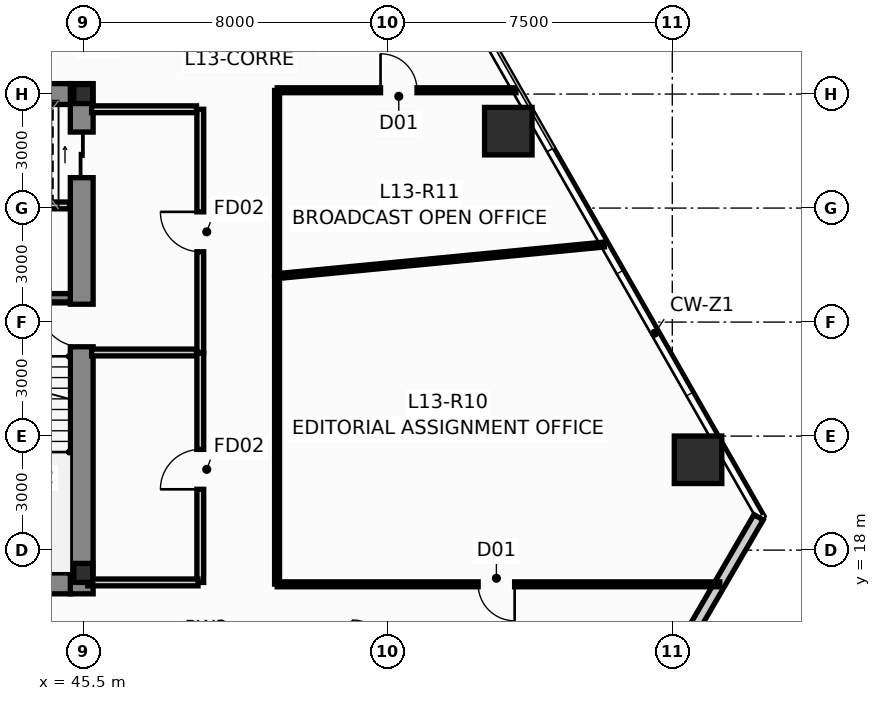
"""IFC4 building model, lengths in metres.
Left out: names, types, materials, properties, quantities, classifications, styles, units other than length and angle.
Written with IfcOpenShell. Run it as: python <this file> out.ifc"""

import sys

from ifc_helpers import new_model, si_unit, direction, frame, frame_2d, origin, origin_2d, place, context, subcontext, project, spatial, rectangle, hollow_rectangle, i_section, extrude, source, transform, mapped, element, fill, save


model = new_model("IFC4")
c1 = context("Model", 3, precision=1e-05, world=origin(), true_north=direction((0.0, 1.0)))
c2 = subcontext(c1, "Body", "Model", "MODEL_VIEW")
j1 = project(units=[si_unit("LENGTHUNIT", "METRE"), si_unit("PLANEANGLEUNIT", "RADIAN")], contexts=[c1])
p1 = place(None, origin())
s1 = spatial("IfcSite", under=j1, at=p1, CompositionType="ELEMENT")
p2 = place(p1, origin())
s2 = spatial("IfcBuilding", under=s1, at=p2, CompositionType="ELEMENT")
p3 = place(p2, frame((0.0, 0.0, 53.15)))
s3 = spatial("IfcBuildingStorey", under=s2, at=p3, CompositionType="ELEMENT", Elevation=53.15)
m1 = source(origin(), c2, "Body", "SweptSolid", [
    extrude(i_section(OverallWidth=0.5, OverallDepth=0.5, WebThickness=0.028, FlangeThickness=0.04, at=origin_2d()), origin(), (0.0, 0.0, 1.0), 3.65),
])
for number, where, z_axis, x_axis in (
    (1, (45.5, 17.4, 0.0), (0.0, 0.0, 1.0), (1.0, 0.0, 0.0)),
    (2, (45.5, 30.0, 0.0), (0.0, 0.0, 1.0), (1.0, 0.0, 0.0)),
):
    element("IfcColumn", number, at=place(p3, frame(where, z_axis=z_axis, x_axis=x_axis)), inside=s3, PredefinedType="COLUMN", context=c2, shape_type="MappedRepresentation", body=[
        mapped(m1, transform((0.0, 0.0, 0.0), scale=1.0)),
    ])
p4 = place(p3, frame((45.46, 16.85, 0.0), z_axis=(0.0, 0.0, 1.0), x_axis=(0.0, 1.0, 0.0)))
e3 = element("IfcWall", 3, at=p4, inside=s3, PredefinedType="SHEAR", context=c2, shape_type="SweptSolid", body=[
    extrude(rectangle(XDim=13.425, YDim=0.6, at=frame_2d((6.712, 0.0))), origin(), (0.0, 0.0, 1.0), 3.65),
])
p5 = place(p4, frame((6.5, 0.0, 0.0)))
e4 = element("IfcOpeningElement", 4, at=p5, cuts=e3, PredefinedType="OPENING", context=c2, shape_type="SweptSolid", body=[
    extrude(rectangle(XDim=1.12, YDim=2.15, at=frame_2d((0.56, 1.075))), frame((0.0, 0.312, 0.0), z_axis=(0.0, -1.0, 0.0), x_axis=(1.0, 0.0, 0.0)), (0.0, 0.0, 1.0), 0.624),
])
p6 = place(p4, frame((10.95, 0.0, 0.0)))
e5 = element("IfcOpeningElement", 5, at=p6, cuts=e3, PredefinedType="OPENING", context=c2, shape_type="SweptSolid", body=[
    extrude(rectangle(XDim=1.2, YDim=2.2, at=frame_2d((0.6, 1.1))), frame((0.0, 0.312, 0.0), z_axis=(0.0, -1.0, 0.0), x_axis=(1.0, 0.0, 0.0)), (0.0, 0.0, 1.0), 0.624),
])
for number, where, z_axis, x_axis in (
    (6, (42.26, 17.125, 0.0), (0.0, 0.0, 1.0), (1.0, 0.0, 0.0)),
    (7, (42.26, 30.0, 0.0), (0.0, 0.0, 1.0), (1.0, 0.0, 0.0)),
):
    element("IfcWall", number, at=place(p3, frame(where, z_axis=z_axis, x_axis=x_axis)), inside=s3, PredefinedType="SHEAR", context=c2, shape_type="SweptSolid", body=[
        extrude(rectangle(XDim=2.9, YDim=0.55, at=frame_2d((1.45, 0.0))), origin(), (0.0, 0.0, 1.0), 3.65),
    ])
p7 = place(p3, frame((42.26, 24.64, 0.0), z_axis=(0.0, 0.0, 1.0), x_axis=(1.0, 0.0, 0.0)))
e8 = element("IfcWall", 8, at=p7, inside=s3, PredefinedType="SHEAR", context=c2, shape_type="SweptSolid", body=[
    extrude(rectangle(XDim=2.9, YDim=0.22, at=frame_2d((1.45, 0.0))), origin(), (0.0, 0.0, 1.0), 3.65),
])
m2 = source(origin(), c2, "Body", "SweptSolid", [
    extrude(hollow_rectangle(XDim=1.25, YDim=1.25, WallThickness=0.07, at=origin_2d()), origin(), (0.0, 0.0, 1.0), 3.651),
])
p8 = place(p3, frame((61.677, 20.377, 0.0), z_axis=(-0.010364224337, -0.0215977062, 0.999713019792), x_axis=(0.901566609123, -0.432640323264, 0.0)))
e9 = element("IfcColumn", 9, at=p8, inside=s3, PredefinedType="COLUMN", context=c2, shape_type="MappedRepresentation", body=[
    mapped(m2, transform((0.0, 0.0, 0.0), scale=1.0)),
])
m3 = source(origin(), c2, "Body", "SweptSolid", [
    extrude(hollow_rectangle(XDim=1.25, YDim=1.25, WallThickness=0.07, at=origin_2d()), origin(), (0.0, 0.0, 1.0), 3.651),
])
p9 = place(p3, frame((56.686, 29.024, 0.0), z_axis=(-0.014912316331, -0.013775502979, 0.999793907933), x_axis=(0.678553674548, -0.734550822447, 0.0)))
e10 = element("IfcColumn", 10, at=p9, inside=s3, PredefinedType="COLUMN", context=c2, shape_type="MappedRepresentation", body=[
    mapped(m3, transform((0.0, 0.0, 0.0), scale=1.0)),
])
p10 = place(p3, frame((63.27, 18.864, 0.0), z_axis=(0.0, 0.0, 1.0), x_axis=(-0.502874450926, -0.864359466082, 0.0)))
e11 = element("IfcWall", 11, at=p10, inside=s3, PredefinedType="STANDARD", context=c2, shape_type="SweptSolid", body=[
    extrude(rectangle(XDim=16.471, YDim=0.28, at=frame_2d((8.236, 0.0))), origin(), (0.0, 0.0, 1.0), 3.4),
])
p11 = place(p10, frame((7.34, 0.0, 0.9)))
e12 = element("IfcOpeningElement", 12, at=p11, cuts=e11, PredefinedType="OPENING", context=c2, shape_type="SweptSolid", body=[
    extrude(rectangle(XDim=1.8, YDim=1.8, at=frame_2d((0.9, 0.9))), frame((0.0, 0.152, 0.0), z_axis=(0.0, -1.0, 0.0), x_axis=(1.0, 0.0, 0.0)), (0.0, 0.0, 1.0), 0.304),
])
p12 = place(p3, frame((48.58, 23.2, 0.0), z_axis=(0.0, 0.0, 1.0), x_axis=(0.0, 1.0, 0.0)))
e13 = element("IfcWall", 13, at=p12, inside=s3, PredefinedType="PARTITIONING", context=c2, shape_type="SweptSolid", body=[
    extrude(rectangle(XDim=6.4, YDim=0.18, at=frame_2d((3.2, 0.0))), origin(), (0.0, 0.0, 1.0), 3.027),
])
p13 = place(p12, frame((2.65, 0.0, 0.0)))
e14 = element("IfcOpeningElement", 14, at=p13, cuts=e13, PredefinedType="OPENING", context=c2, shape_type="SweptSolid", body=[
    extrude(rectangle(XDim=1.05, YDim=2.15, at=frame_2d((0.525, 1.075))), frame((0.0, 0.102, 0.0), z_axis=(0.0, -1.0, 0.0), x_axis=(1.0, 0.0, 0.0)), (0.0, 0.0, 1.0), 0.204),
])
p14 = place(p3, frame((45.72, 23.2, 0.0), z_axis=(0.0, 0.0, 1.0), x_axis=(1.0, 0.0, 0.0)))
e15 = element("IfcWall", 15, at=p14, inside=s3, PredefinedType="PARTITIONING", context=c2, shape_type="SweptSolid", body=[
    extrude(rectangle(XDim=2.76, YDim=0.18, at=frame_2d((1.38, 0.0))), origin(), (0.0, 0.0, 1.0), 3.4),
])
p15 = place(p3, frame((45.72, 29.6, 0.0), z_axis=(0.0, 0.0, 1.0), x_axis=(1.0, 0.0, 0.0)))
e16 = element("IfcWall", 16, at=p15, inside=s3, PredefinedType="PARTITIONING", context=c2, shape_type="SweptSolid", body=[
    extrude(rectangle(XDim=2.76, YDim=0.18, at=frame_2d((1.38, 0.0))), origin(), (0.0, 0.0, 1.0), 2.783),
])
p16 = place(p3, frame((42.24, 27.07, 0.0), z_axis=(0.0, 0.0, 1.0), x_axis=(1.0, 0.0, 0.0)))
e17 = element("IfcWall", 17, at=p16, inside=s3, PredefinedType="PARTITIONING", context=c2, shape_type="SweptSolid", body=[
    extrude(rectangle(XDim=2.9, YDim=0.18, at=frame_2d((1.45, 0.0))), origin(), (0.0, 0.0, 1.0), 3.4),
])
p17 = place(p3, frame((48.58, 17.15, 0.0), z_axis=(0.0, 0.0, 1.0), x_axis=(0.0, 1.0, 0.0)))
e18 = element("IfcWall", 18, at=p17, inside=s3, PredefinedType="PARTITIONING", context=c2, shape_type="SweptSolid", body=[
    extrude(rectangle(XDim=6.03, YDim=0.18, at=frame_2d((3.015, 0.0))), origin(), (0.0, 0.0, 1.0), 3.4),
])
p18 = place(p17, frame((2.45, 0.0, 0.0)))
e19 = element("IfcOpeningElement", 19, at=p18, cuts=e18, PredefinedType="OPENING", context=c2, shape_type="SweptSolid", body=[
    extrude(rectangle(XDim=1.05, YDim=2.15, at=frame_2d((0.525, 1.075))), frame((0.0, 0.102, 0.0), z_axis=(0.0, -1.0, 0.0), x_axis=(1.0, 0.0, 0.0)), (0.0, 0.0, 1.0), 0.204),
])
p19 = place(p3, frame((45.62, 17.15, 0.0), z_axis=(0.0, 0.0, 1.0), x_axis=(1.0, 0.0, 0.0)))
e20 = element("IfcWall", 20, at=p19, inside=s3, PredefinedType="PARTITIONING", context=c2, shape_type="SweptSolid", body=[
    extrude(rectangle(XDim=2.9, YDim=0.18, at=frame_2d((1.45, 0.0))), origin(), (0.0, 0.0, 1.0), 2.783),
])
p20 = place(p3, frame((62.25, 17.1, 0.0), z_axis=(0.0, 0.0, 1.0), x_axis=(-1.0, 0.0, 0.0)))
e21 = element("IfcWall", 21, at=p20, inside=s3, PredefinedType="PARTITIONING", context=c2, shape_type="SweptSolid", body=[
    extrude(rectangle(XDim=11.645, YDim=0.13, at=frame_2d((5.822, 0.0))), origin(), (0.0, 0.0, 1.0), 3.4),
])
p21 = place(p20, frame((5.398, 0.0, 0.0)))
e22 = element("IfcOpeningElement", 22, at=p21, cuts=e21, PredefinedType="OPENING", context=c2, shape_type="SweptSolid", body=[
    extrude(rectangle(XDim=0.96, YDim=2.15, at=frame_2d((0.48, 1.075))), frame((0.0, 0.077, 0.0), z_axis=(0.0, -1.0, 0.0), x_axis=(1.0, 0.0, 0.0)), (0.0, 0.0, 1.0), 0.154),
])
p22 = place(p3, frame((50.605, 25.21, 0.0), z_axis=(0.0, 0.0, 1.0), x_axis=(0.995375580707, 0.096059634254, 0.0)))
e23 = element("IfcWall", 23, at=p22, inside=s3, PredefinedType="PARTITIONING", context=c2, shape_type="SweptSolid", body=[
    extrude(rectangle(XDim=8.641, YDim=0.13, at=frame_2d((4.321, 0.0))), origin(), (0.0, 0.0, 1.0), 3.4),
])
p23 = place(p3, frame((50.6, 17.105, 0.0), z_axis=(0.0, 0.0, 1.0), x_axis=(0.0, 1.0, 0.0)))
e24 = element("IfcWall", 24, at=p23, inside=s3, PredefinedType="PARTITIONING", context=c2, shape_type="SweptSolid", body=[
    extrude(rectangle(XDim=8.1, YDim=0.13, at=frame_2d((4.05, 0.0))), origin(), (0.0, 0.0, 1.0), 3.027),
])
p24 = place(p3, frame((50.605, 30.1, 0.0), z_axis=(0.0, 0.0, 1.0), x_axis=(1.0, 0.0, 0.0)))
e25 = element("IfcWall", 25, at=p24, inside=s3, PredefinedType="PARTITIONING", context=c2, shape_type="SweptSolid", body=[
    extrude(rectangle(XDim=6.282, YDim=0.13, at=frame_2d((3.141, 0.0))), origin(), (0.0, 0.0, 1.0), 3.4),
])
p25 = place(p24, frame((2.718, 0.0, 0.0)))
e26 = element("IfcOpeningElement", 26, at=p25, cuts=e25, PredefinedType="OPENING", context=c2, shape_type="SweptSolid", body=[
    extrude(rectangle(XDim=0.96, YDim=2.15, at=frame_2d((0.48, 1.075))), frame((0.0, 0.077, 0.0), z_axis=(0.0, -1.0, 0.0), x_axis=(1.0, 0.0, 0.0)), (0.0, 0.0, 1.0), 0.154),
])
p26 = place(p3, frame((50.6, 25.215, 0.0), z_axis=(0.0, 0.0, 1.0), x_axis=(0.0, 1.0, 0.0)))
e27 = element("IfcWall", 27, at=p26, inside=s3, PredefinedType="PARTITIONING", context=c2, shape_type="SweptSolid", body=[
    extrude(rectangle(XDim=4.88, YDim=0.13, at=frame_2d((2.44, 0.0))), origin(), (0.0, 0.0, 1.0), 3.027),
])
p27 = place(p5, origin())
e28 = element("IfcDoor", 28, at=p27, inside=s3, OperationType="SINGLE_SWING_RIGHT", PredefinedType="DOOR", context=c2, shape_type="SweptSolid", body=[
    extrude(rectangle(XDim=1.12, YDim=2.15, at=frame_2d((0.56, 1.075))), frame((0.0, 0.025, 0.0), z_axis=(0.0, -1.0, 0.0), x_axis=(1.0, 0.0, 0.0)), (0.0, 0.0, 1.0), 0.05),
])
fill(e4, e28)
p28 = place(p6, origin())
e29 = element("IfcDoor", 29, at=p28, inside=s3, OperationType="SLIDING_TO_RIGHT", PredefinedType="DOOR", context=c2, shape_type="SweptSolid", body=[
    extrude(rectangle(XDim=1.2, YDim=2.2, at=frame_2d((0.6, 1.1))), frame((0.0, 0.025, 0.0), z_axis=(0.0, -1.0, 0.0), x_axis=(1.0, 0.0, 0.0)), (0.0, 0.0, 1.0), 0.05),
])
fill(e5, e29)
p29 = place(p13, origin())
e30 = element("IfcDoor", 30, at=p29, inside=s3, OperationType="SINGLE_SWING_RIGHT", PredefinedType="DOOR", context=c2, shape_type="SweptSolid", body=[
    extrude(rectangle(XDim=1.05, YDim=2.15, at=frame_2d((0.525, 1.075))), frame((0.0, 0.025, 0.0), z_axis=(0.0, -1.0, 0.0), x_axis=(1.0, 0.0, 0.0)), (0.0, 0.0, 1.0), 0.05),
])
fill(e14, e30)
p30 = place(p18, origin())
e31 = element("IfcDoor", 31, at=p30, inside=s3, OperationType="SINGLE_SWING_LEFT", PredefinedType="DOOR", context=c2, shape_type="SweptSolid", body=[
    extrude(rectangle(XDim=1.05, YDim=2.15, at=frame_2d((0.525, 1.075))), frame((0.0, 0.025, 0.0), z_axis=(0.0, -1.0, 0.0), x_axis=(1.0, 0.0, 0.0)), (0.0, 0.0, 1.0), 0.05),
])
fill(e19, e31)
p31 = place(p21, origin())
e32 = element("IfcDoor", 32, at=p31, inside=s3, OperationType="SINGLE_SWING_LEFT", PredefinedType="DOOR", context=c2, shape_type="SweptSolid", body=[
    extrude(rectangle(XDim=0.96, YDim=2.15, at=frame_2d((0.48, 1.075))), frame((0.0, 0.025, 0.0), z_axis=(0.0, -1.0, 0.0), x_axis=(1.0, 0.0, 0.0)), (0.0, 0.0, 1.0), 0.05),
])
fill(e22, e32)
p32 = place(p25, origin())
e33 = element("IfcDoor", 33, at=p32, inside=s3, OperationType="SINGLE_SWING_LEFT", PredefinedType="DOOR", context=c2, shape_type="SweptSolid", body=[
    extrude(rectangle(XDim=0.96, YDim=2.15, at=frame_2d((0.48, 1.075))), frame((0.0, 0.025, 0.0), z_axis=(0.0, -1.0, 0.0), x_axis=(1.0, 0.0, 0.0)), (0.0, 0.0, 1.0), 0.05),
])
fill(e26, e33)
save(model, sys.argv[1])
